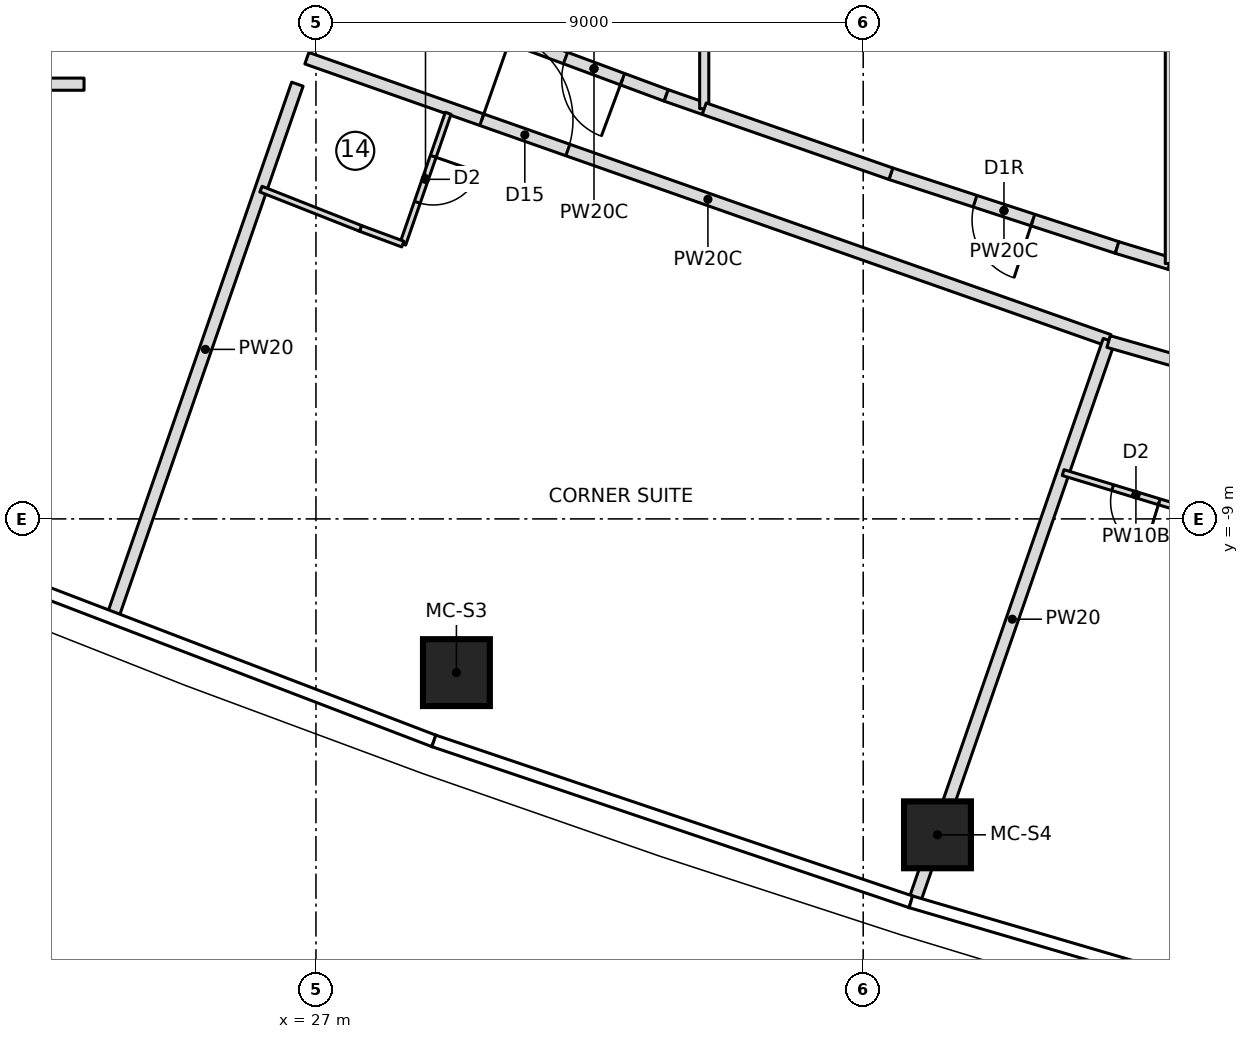
"""IFC4 building model, lengths in metres.
Left out: names, types, materials, properties, quantities, classifications, styles, units other than length and angle.
Written with IfcOpenShell. Run it as: python <this file> out.ifc"""

import sys

from ifc_helpers import new_model, si_unit, direction, frame, frame_2d, origin, origin_2d, place, context, subcontext, project, spatial, rectangle, extrude, element, fill, save


model = new_model("IFC4")
c1 = context("Model", 3, precision=1e-05, world=origin(), true_north=direction((0.0, 1.0)))
c2 = subcontext(c1, "Body", "Model", "MODEL_VIEW")
j1 = project(units=[si_unit("LENGTHUNIT", "METRE"), si_unit("PLANEANGLEUNIT", "RADIAN")], contexts=[c1])
p1 = place(None, origin())
s1 = spatial("IfcSite", under=j1, at=p1, CompositionType="ELEMENT")
p2 = place(p1, origin())
s2 = spatial("IfcBuilding", under=s1, at=p2, CompositionType="ELEMENT")
p3 = place(p2, frame((0.0, 0.0, 285.65)))
s3 = spatial("IfcBuildingStorey", under=s2, at=p3, CompositionType="ELEMENT", Elevation=285.65)
for number, where, z_axis, x_axis in (
    (1, (29.31, -11.528, 0.0), (0.0, 0.0, 1.0), (1.0, 0.0, 0.0)),
    (2, (37.221, -14.196, 0.0), (0.0, 0.0, 1.0), (1.0, 0.0, 0.0)),
):
    element("IfcColumn", number, at=place(p3, frame(where, z_axis=z_axis, x_axis=x_axis)), inside=s3, PredefinedType="COLUMN", context=c2, shape_type="SweptSolid", body=[
        extrude(rectangle(XDim=1.1, YDim=1.1, at=origin_2d()), origin(), (0.0, 0.0, 1.0), 3.55),
    ])
p4 = place(p3, frame((7.287, -1.85, 0.0), z_axis=(0.0, 0.0, 1.0), x_axis=(1.0, 0.0, 0.0)))
e3 = element("IfcWall", 3, at=p4, inside=s3, PredefinedType="PARTITIONING", context=c2, shape_type="SweptSolid", body=[
    extrude(rectangle(XDim=15.899, YDim=0.2, at=frame_2d((7.949, 0.0))), origin(), (0.0, 0.0, 1.0), 3.25),
])
p5 = place(p4, frame((7.624, 0.0, 0.0)))
e4 = element("IfcOpeningElement", 4, at=p5, cuts=e3, PredefinedType="OPENING", context=c2, shape_type="SweptSolid", body=[
    extrude(rectangle(XDim=1.0, YDim=2.1, at=frame_2d((0.5, 1.05))), frame((0.0, 0.11, 0.0), z_axis=(0.0, -1.0, 0.0), x_axis=(1.0, 0.0, 0.0)), (0.0, 0.0, 1.0), 0.22),
])
p6 = place(p3, frame((23.668, -10.573, 0.0), z_axis=(0.0, 0.0, 1.0), x_axis=(0.327714422317, 0.944776829418, 0.0)))
e5 = element("IfcWall", 5, at=p6, inside=s3, PredefinedType="PARTITIONING", context=c2, shape_type="SweptSolid", body=[
    extrude(rectangle(XDim=9.233, YDim=0.2, at=frame_2d((4.617, 0.0))), origin(), (0.0, 0.0, 1.0), 3.25),
])
p7 = place(p3, frame((26.85, -1.423, 0.0), z_axis=(0.0, 0.0, 1.0), x_axis=(0.943328585164, -0.331860182022, 0.0)))
e6 = element("IfcWall", 6, at=p7, inside=s3, PredefinedType="PARTITIONING", context=c2, shape_type="SweptSolid", body=[
    extrude(rectangle(XDim=13.984, YDim=0.2, at=frame_2d((6.992, 0.0))), origin(), (0.0, 0.0, 1.0), 3.25),
])
p8 = place(p7, frame((3.05, 0.0, 0.0)))
e7 = element("IfcOpeningElement", 7, at=p8, cuts=e6, PredefinedType="OPENING", context=c2, shape_type="SweptSolid", body=[
    extrude(rectangle(XDim=1.5, YDim=2.1, at=frame_2d((0.75, 1.05))), frame((0.0, 0.11, 0.0), z_axis=(0.0, -1.0, 0.0), x_axis=(1.0, 0.0, 0.0)), (0.0, 0.0, 1.0), 0.22),
])
p9 = place(p3, frame((29.175, -2.328, 0.0), z_axis=(0.0, 0.0, 1.0), x_axis=(-0.327718024288, -0.944775579996, 0.0)))
e8 = element("IfcWall", 8, at=p9, inside=s3, PredefinedType="PARTITIONING", context=c2, shape_type="SweptSolid", body=[
    extrude(rectangle(XDim=2.277, YDim=0.1, at=frame_2d((1.139, 0.0))), origin(), (0.0, 0.0, 1.0), 3.25),
])
p10 = place(p9, frame((0.75, 0.0, 0.0)))
e9 = element("IfcOpeningElement", 9, at=p10, cuts=e8, PredefinedType="OPENING", context=c2, shape_type="SweptSolid", body=[
    extrude(rectangle(XDim=0.8, YDim=2.1, at=frame_2d((0.4, 1.05))), frame((0.0, 0.06, 0.0), z_axis=(0.0, -1.0, 0.0), x_axis=(1.0, 0.0, 0.0)), (0.0, 0.0, 1.0), 0.12),
])
p11 = place(p3, frame((28.428, -4.48, 0.0), z_axis=(0.0, 0.0, 1.0), x_axis=(-0.937514267289, 0.347946833049, 0.0)))
e10 = element("IfcWall", 10, at=p11, inside=s3, PredefinedType="PARTITIONING", context=c2, shape_type="SweptSolid", body=[
    extrude(rectangle(XDim=0.742, YDim=0.1, at=frame_2d((0.371, 0.0))), origin(), (0.0, 0.0, 1.0), 3.25),
])
p12 = place(p3, frame((27.733, -4.222, 0.0), z_axis=(0.0, 0.0, 1.0), x_axis=(-0.930254925629, 0.366913850028, 0.0)))
e11 = element("IfcWall", 11, at=p12, inside=s3, PredefinedType="PARTITIONING", context=c2, shape_type="SweptSolid", body=[
    extrude(rectangle(XDim=1.76, YDim=0.1, at=frame_2d((0.88, 0.0))), origin(), (0.0, 0.0, 1.0), 3.25),
])
p13 = place(p3, frame((36.861, -15.235, 0.0), z_axis=(0.0, 0.0, 1.0), x_axis=(0.327710853631, 0.944778067279, 0.0)))
e12 = element("IfcWall", 12, at=p13, inside=s3, PredefinedType="PARTITIONING", context=c2, shape_type="SweptSolid", body=[
    extrude(rectangle(XDim=9.707, YDim=0.2, at=frame_2d((4.854, 0.0))), origin(), (0.0, 0.0, 1.0), 3.25),
])
p14 = place(p3, frame((40.035, -6.083, 0.0), z_axis=(0.0, 0.0, 1.0), x_axis=(0.961195333593, -0.275868683759, 0.0)))
e13 = element("IfcWall", 13, at=p14, inside=s3, PredefinedType="PARTITIONING", context=c2, shape_type="SweptSolid", body=[
    extrude(rectangle(XDim=8.597, YDim=0.2, at=frame_2d((4.298, 0.0))), origin(), (0.0, 0.0, 1.0), 3.25),
])
p15 = place(p14, frame((3.05, 0.0, 0.0)))
e14 = element("IfcOpeningElement", 14, at=p15, cuts=e13, PredefinedType="OPENING", context=c2, shape_type="SweptSolid", body=[
    extrude(rectangle(XDim=1.5, YDim=2.1, at=frame_2d((0.75, 1.05))), frame((0.0, 0.11, 0.0), z_axis=(0.0, -1.0, 0.0), x_axis=(1.0, 0.0, 0.0)), (0.0, 0.0, 1.0), 0.22),
])
p16 = place(p3, frame((41.681, -8.966, 0.0), z_axis=(0.0, 0.0, 1.0), x_axis=(-0.956723503196, 0.290998519638, 0.0)))
e15 = element("IfcWall", 15, at=p16, inside=s3, PredefinedType="PARTITIONING", context=c2, shape_type="SweptSolid", body=[
    extrude(rectangle(XDim=2.502, YDim=0.1, at=frame_2d((1.251, 0.0))), origin(), (0.0, 0.0, 1.0), 3.25),
])
p17 = place(p16, frame((0.85, 0.0, 0.0)))
e16 = element("IfcOpeningElement", 16, at=p17, cuts=e15, PredefinedType="OPENING", context=c2, shape_type="SweptSolid", body=[
    extrude(rectangle(XDim=0.8, YDim=2.1, at=frame_2d((0.4, 1.05))), frame((0.0, 0.06, 0.0), z_axis=(0.0, -1.0, 0.0), x_axis=(1.0, 0.0, 0.0)), (0.0, 0.0, 1.0), 0.12),
])
p18 = place(p3, frame((32.76, -2.035, 0.0), z_axis=(0.0, 0.0, 1.0), x_axis=(-0.937461225735, 0.348089715797, 0.0)))
e17 = element("IfcWall", 17, at=p18, inside=s3, PredefinedType="PARTITIONING", context=c2, shape_type="SweptSolid", body=[
    extrude(rectangle(XDim=2.533, YDim=0.2, at=frame_2d((1.266, 0.0))), origin(), (0.0, 0.0, 1.0), 3.25),
])
p19 = place(p18, frame((0.766, 0.0, 0.0)))
e18 = element("IfcOpeningElement", 18, at=p19, cuts=e17, PredefinedType="OPENING", context=c2, shape_type="SweptSolid", body=[
    extrude(rectangle(XDim=1.0, YDim=2.1, at=frame_2d((0.5, 1.05))), frame((0.0, 0.11, 0.0), z_axis=(0.0, -1.0, 0.0), x_axis=(1.0, 0.0, 0.0)), (0.0, 0.0, 1.0), 0.22),
])
p20 = place(p3, frame((33.385, -2.253, 0.0), z_axis=(0.0, 0.0, 1.0), x_axis=(-0.944322693955, 0.329020743543, 0.0)))
e19 = element("IfcWall", 19, at=p20, inside=s3, PredefinedType="PARTITIONING", context=c2, shape_type="SweptSolid", body=[
    extrude(rectangle(XDim=0.663, YDim=0.2, at=frame_2d((0.331, 0.0))), origin(), (0.0, 0.0, 1.0), 3.25),
])
p21 = place(p3, frame((33.385, -2.253, 0.0), z_axis=(0.0, 0.0, 1.0), x_axis=(0.0, 1.0, 0.0)))
e20 = element("IfcWall", 20, at=p21, inside=s3, PredefinedType="PARTITIONING", context=c2, shape_type="SweptSolid", body=[
    extrude(rectangle(XDim=4.506, YDim=0.15, at=frame_2d((2.253, 0.0))), origin(), (0.0, 0.0, 1.0), 3.25),
])
p22 = place(p3, frame((40.175, -4.536, 0.0), z_axis=(0.0, 0.0, 1.0), x_axis=(-0.950709849021, 0.310081897206, 0.0)))
e21 = element("IfcWall", 21, at=p22, inside=s3, PredefinedType="PARTITIONING", context=c2, shape_type="SweptSolid", body=[
    extrude(rectangle(XDim=3.913, YDim=0.2, at=frame_2d((1.957, 0.0))), origin(), (0.0, 0.0, 1.0), 3.25),
])
p23 = place(p22, frame((1.457, 0.0, 0.0)))
e22 = element("IfcOpeningElement", 22, at=p23, cuts=e21, PredefinedType="OPENING", context=c2, shape_type="SweptSolid", body=[
    extrude(rectangle(XDim=1.0, YDim=2.1, at=frame_2d((0.5, 1.05))), frame((0.0, 0.11, 0.0), z_axis=(0.0, -1.0, 0.0), x_axis=(1.0, 0.0, 0.0)), (0.0, 0.0, 1.0), 0.22),
])
p24 = place(p3, frame((41.043, -4.8, 0.0), z_axis=(0.0, 0.0, 1.0), x_axis=(-0.956745556466, 0.290926004652, 0.0)))
e23 = element("IfcWall", 23, at=p24, inside=s3, PredefinedType="PARTITIONING", context=c2, shape_type="SweptSolid", body=[
    extrude(rectangle(XDim=0.907, YDim=0.2, at=frame_2d((0.454, 0.0))), origin(), (0.0, 0.0, 1.0), 3.25),
])
p25 = place(p3, frame((36.455, -3.323, 0.0), z_axis=(0.0, 0.0, 1.0), x_axis=(-0.944275670423, 0.329155674791, 0.0)))
e24 = element("IfcWall", 24, at=p25, inside=s3, PredefinedType="PARTITIONING", context=c2, shape_type="SweptSolid", body=[
    extrude(rectangle(XDim=3.25, YDim=0.2, at=frame_2d((1.625, 0.0))), origin(), (0.0, 0.0, 1.0), 3.25),
])
p26 = place(p3, frame((41.043, -4.8, 0.0), z_axis=(0.0, 0.0, 1.0), x_axis=(0.0, 1.0, 0.0)))
e25 = element("IfcWall", 25, at=p26, inside=s3, PredefinedType="PARTITIONING", context=c2, shape_type="SweptSolid", body=[
    extrude(rectangle(XDim=9.6, YDim=0.15, at=frame_2d((4.8, 0.0))), origin(), (0.0, 0.0, 1.0), 3.25),
])
p27 = place(p3, frame((43.918, -5.675, 0.0), z_axis=(0.0, 0.0, 1.0), x_axis=(-0.956717150932, 0.291019403327, 0.0)))
e26 = element("IfcWall", 26, at=p27, inside=s3, PredefinedType="PARTITIONING", context=c2, shape_type="SweptSolid", body=[
    extrude(rectangle(XDim=3.006, YDim=0.2, at=frame_2d((1.503, 0.0))), origin(), (0.0, 0.0, 1.0), 3.25),
])
p28 = place(p10, origin())
e27 = element("IfcDoor", 27, at=p28, inside=s3, OperationType="SINGLE_SWING_LEFT", PredefinedType="DOOR", context=c2, shape_type="SweptSolid", body=[
    extrude(rectangle(XDim=0.8, YDim=2.1, at=frame_2d((0.4, 1.05))), frame((0.0, 0.025, 0.0), z_axis=(0.0, -1.0, 0.0), x_axis=(1.0, 0.0, 0.0)), (0.0, 0.0, 1.0), 0.05),
])
fill(e9, e27)
p29 = place(p8, origin())
e28 = element("IfcDoor", 28, at=p29, inside=s3, OperationType="DOUBLE_DOOR_SINGLE_SWING", PredefinedType="DOOR", context=c2, shape_type="SweptSolid", body=[
    extrude(rectangle(XDim=1.5, YDim=2.1, at=frame_2d((0.75, 1.05))), frame((0.0, 0.025, 0.0), z_axis=(0.0, -1.0, 0.0), x_axis=(1.0, 0.0, 0.0)), (0.0, 0.0, 1.0), 0.05),
])
fill(e7, e28)
p30 = place(p17, origin())
e29 = element("IfcDoor", 29, at=p30, inside=s3, OperationType="SINGLE_SWING_LEFT", PredefinedType="DOOR", context=c2, shape_type="SweptSolid", body=[
    extrude(rectangle(XDim=0.8, YDim=2.1, at=frame_2d((0.4, 1.05))), frame((0.0, 0.025, 0.0), z_axis=(0.0, -1.0, 0.0), x_axis=(1.0, 0.0, 0.0)), (0.0, 0.0, 1.0), 0.05),
])
fill(e16, e29)
p31 = place(p19, origin())
e30 = element("IfcDoor", 30, at=p31, inside=s3, OperationType="SINGLE_SWING_LEFT", PredefinedType="DOOR", context=c2, shape_type="SweptSolid", body=[
    extrude(rectangle(XDim=1.0, YDim=2.1, at=frame_2d((0.5, 1.05))), frame((0.0, 0.025, 0.0), z_axis=(0.0, -1.0, 0.0), x_axis=(1.0, 0.0, 0.0)), (0.0, 0.0, 1.0), 0.05),
])
fill(e18, e30)
p32 = place(p23, origin())
e31 = element("IfcDoor", 31, at=p32, inside=s3, OperationType="SINGLE_SWING_RIGHT", PredefinedType="DOOR", context=c2, shape_type="SweptSolid", body=[
    extrude(rectangle(XDim=1.0, YDim=2.1, at=frame_2d((0.5, 1.05))), frame((0.0, 0.025, 0.0), z_axis=(0.0, -1.0, 0.0), x_axis=(1.0, 0.0, 0.0)), (0.0, 0.0, 1.0), 0.05),
])
fill(e22, e31)
save(model, sys.argv[1])
